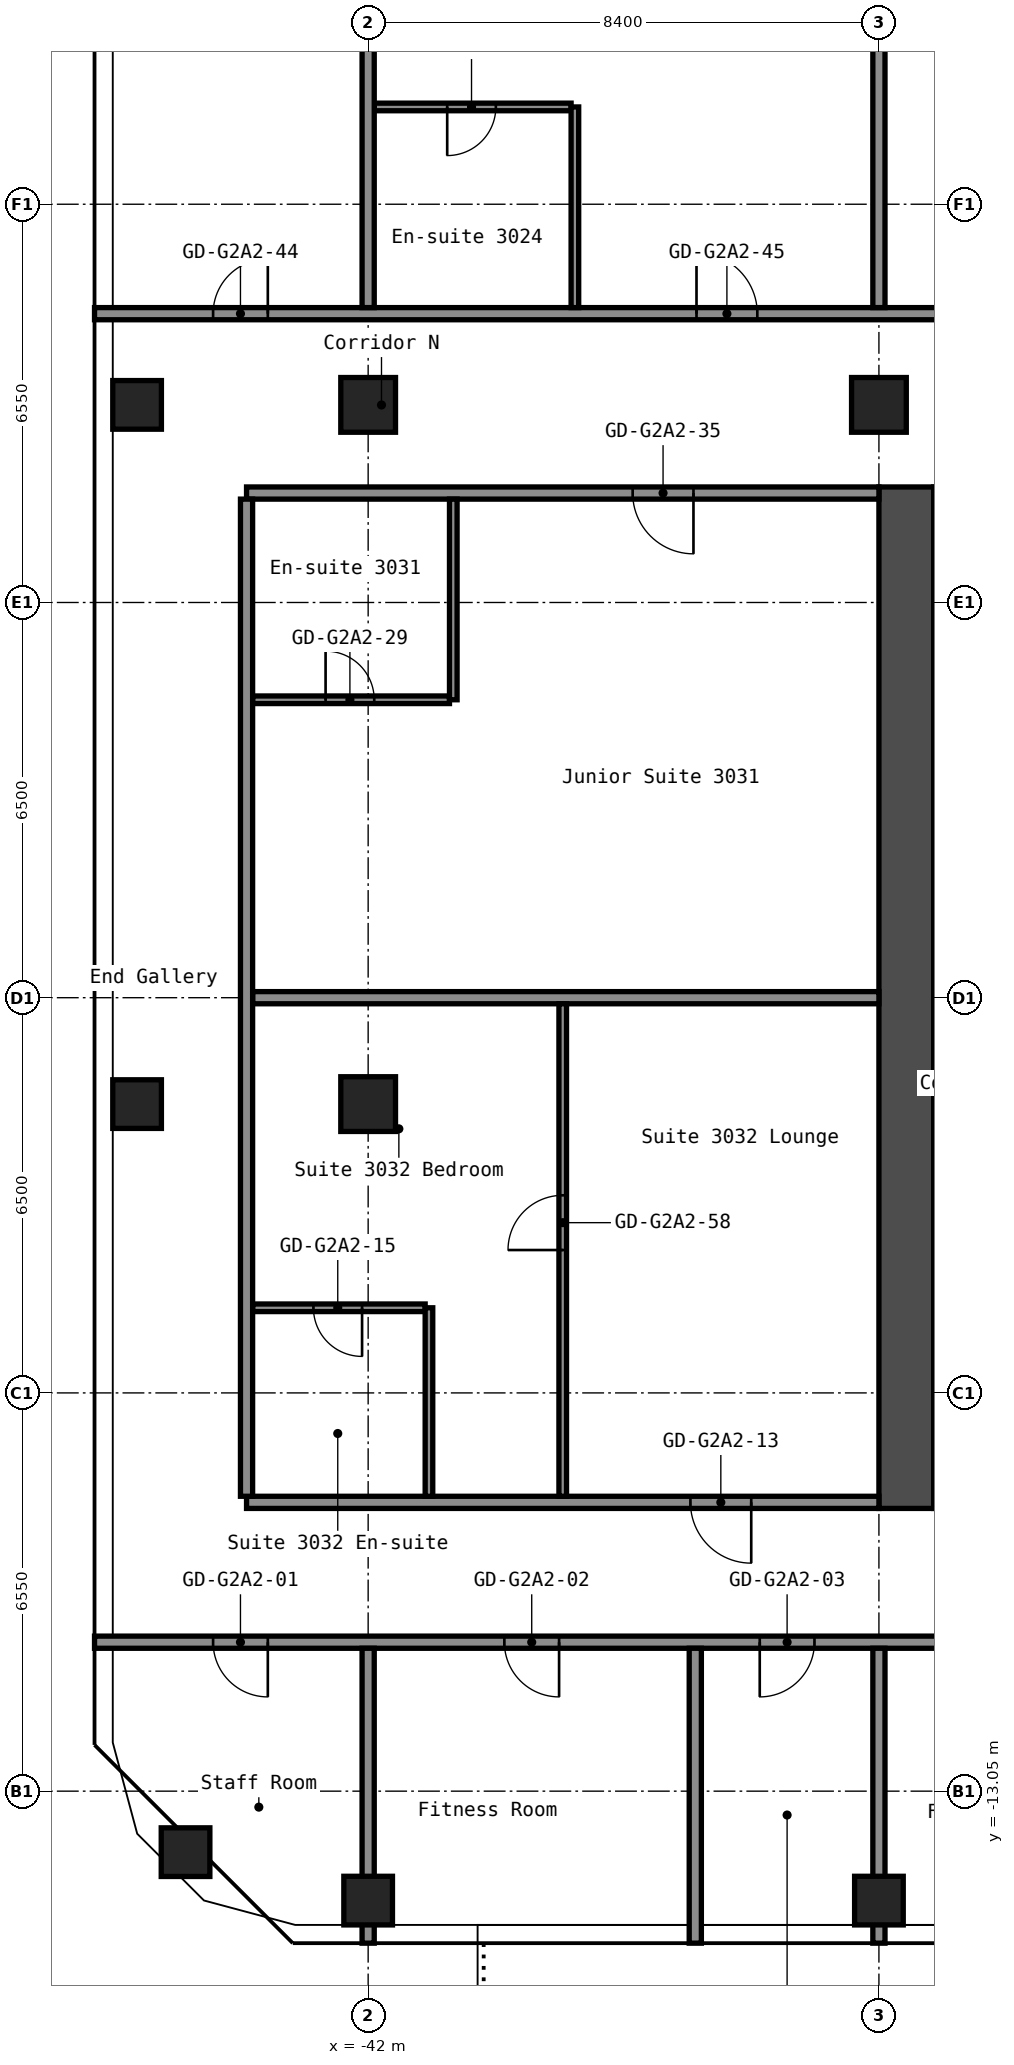
"""IFC4 building model, lengths in metres.
Left out: names, types, materials, properties, quantities, classifications, styles, units other than length and angle.
Written with IfcOpenShell. Run it as: python <this file> out.ifc"""

import sys

from ifc_helpers import new_model, si_unit, direction, frame, frame_2d, origin, origin_2d, place, context, subcontext, project, spatial, rectangle, hollow_rectangle, extrude, element, fill, save


model = new_model("IFC4")
c1 = context("Model", 3, precision=1e-05, world=origin(), true_north=direction((0.0, 1.0)))
c2 = subcontext(c1, "Body", "Model", "MODEL_VIEW")
j1 = project(units=[si_unit("LENGTHUNIT", "METRE"), si_unit("PLANEANGLEUNIT", "RADIAN")], contexts=[c1])
p1 = place(None, origin())
s1 = spatial("IfcSite", under=j1, at=p1, CompositionType="ELEMENT")
p2 = place(p1, origin())
s2 = spatial("IfcBuilding", under=s1, at=p2, CompositionType="ELEMENT")
p3 = place(p2, frame((0.0, 0.0, 107.4)))
s3 = spatial("IfcBuildingStorey", under=s2, at=p3, CompositionType="ELEMENT", Elevation=107.4)
for number, where, z_axis, x_axis in (
    (1, (-45.003, -14.053, 0.0), (0.0, 0.0, 1.0), (1.0, 0.0, 0.0)),
    (2, (-45.8, -1.75, 0.0), (0.0, 0.0, 1.0), (1.0, 0.0, 0.0)),
    (3, (-45.8, 9.75, 0.0), (0.0, 0.0, 1.0), (1.0, 0.0, 0.0)),
    (4, (-42.0, -14.85, 0.0), (0.0, 0.0, 1.0), (1.0, 0.0, 0.0)),
):
    element("IfcColumn", number, at=place(p3, frame(where, z_axis=z_axis, x_axis=x_axis)), inside=s3, PredefinedType="COLUMN", context=c2, shape_type="SweptSolid", body=[
        extrude(hollow_rectangle(XDim=0.8, YDim=0.8, WallThickness=0.032, at=origin_2d()), origin(), (0.0, 0.0, 1.0), 2.8),
    ])
for number, where, z_axis, x_axis in (
    (5, (-42.0, -1.75, 0.0), (0.0, 0.0, 1.0), (1.0, 0.0, 0.0)),
    (6, (-42.0, 9.75, 0.0), (0.0, 0.0, 1.0), (1.0, 0.0, 0.0)),
):
    element("IfcColumn", number, at=place(p3, frame(where, z_axis=z_axis, x_axis=x_axis)), inside=s3, PredefinedType="COLUMN", context=c2, shape_type="SweptSolid", body=[
        extrude(hollow_rectangle(XDim=0.9, YDim=0.9, WallThickness=0.036, at=origin_2d()), origin(), (0.0, 0.0, 1.0), 2.8),
    ])
p4 = place(p3, frame((-33.6, -14.85, 0.0), z_axis=(0.0, 0.0, 1.0), x_axis=(1.0, 0.0, 0.0)))
e7 = element("IfcColumn", 7, at=p4, inside=s3, PredefinedType="COLUMN", context=c2, shape_type="SweptSolid", body=[
    extrude(hollow_rectangle(XDim=0.8, YDim=0.8, WallThickness=0.032, at=origin_2d()), origin(), (0.0, 0.0, 1.0), 2.8),
])
p5 = place(p3, frame((-33.6, 9.75, 0.0), z_axis=(0.0, 0.0, 1.0), x_axis=(1.0, 0.0, 0.0)))
e8 = element("IfcColumn", 8, at=p5, inside=s3, PredefinedType="COLUMN", context=c2, shape_type="SweptSolid", body=[
    extrude(hollow_rectangle(XDim=0.9, YDim=0.9, WallThickness=0.036, at=origin_2d()), origin(), (0.0, 0.0, 1.0), 2.8),
])
p6 = place(p3, frame((-33.15, -8.4, 0.0), z_axis=(0.0, 0.0, 1.0), x_axis=(0.0, 1.0, 0.0)))
e9 = element("IfcWall", 9, at=p6, inside=s3, PredefinedType="SHEAR", context=c2, shape_type="SweptSolid", body=[
    extrude(rectangle(XDim=16.8, YDim=0.9, at=frame_2d((8.4, 0.0))), origin(), (0.0, 0.0, 1.0), 2.8),
])
p7 = place(p3, frame((-46.5, -10.6, 0.0), z_axis=(0.0, 0.0, 1.0), x_axis=(1.0, 0.0, 0.0)))
e10 = element("IfcWall", 10, at=p7, inside=s3, PredefinedType="PARTITIONING", context=c2, shape_type="SweptSolid", body=[
    extrude(rectangle(XDim=29.7, YDim=0.2, at=frame_2d((14.85, 0.0))), origin(), (0.0, 0.0, 1.0), 2.8),
])
p8 = place(p7, frame((1.95, 0.0, 0.0)))
e11 = element("IfcOpeningElement", 11, at=p8, cuts=e10, PredefinedType="OPENING", context=c2, shape_type="SweptSolid", body=[
    extrude(rectangle(XDim=0.9, YDim=2.1, at=frame_2d((0.45, 1.05))), frame((0.0, 0.11, 0.0), z_axis=(0.0, -1.0, 0.0), x_axis=(1.0, 0.0, 0.0)), (0.0, 0.0, 1.0), 0.22),
])
p9 = place(p7, frame((6.74, 0.0, 0.0)))
e12 = element("IfcOpeningElement", 12, at=p9, cuts=e10, PredefinedType="OPENING", context=c2, shape_type="SweptSolid", body=[
    extrude(rectangle(XDim=0.9, YDim=2.1, at=frame_2d((0.45, 1.05))), frame((0.0, 0.11, 0.0), z_axis=(0.0, -1.0, 0.0), x_axis=(1.0, 0.0, 0.0)), (0.0, 0.0, 1.0), 0.22),
])
p10 = place(p7, frame((10.94, 0.0, 0.0)))
e13 = element("IfcOpeningElement", 13, at=p10, cuts=e10, PredefinedType="OPENING", context=c2, shape_type="SweptSolid", body=[
    extrude(rectangle(XDim=0.9, YDim=2.1, at=frame_2d((0.45, 1.05))), frame((0.0, 0.11, 0.0), z_axis=(0.0, -1.0, 0.0), x_axis=(1.0, 0.0, 0.0)), (0.0, 0.0, 1.0), 0.22),
])
p11 = place(p7, frame((15.055, 0.0, 0.0)))
e14 = element("IfcOpeningElement", 14, at=p11, cuts=e10, PredefinedType="OPENING", context=c2, shape_type="SweptSolid", body=[
    extrude(rectangle(XDim=0.9, YDim=2.1, at=frame_2d((0.45, 1.05))), frame((0.0, 0.11, 0.0), z_axis=(0.0, -1.0, 0.0), x_axis=(1.0, 0.0, 0.0)), (0.0, 0.0, 1.0), 0.22),
])
p12 = place(p7, frame((19.255, 0.0, 0.0)))
e15 = element("IfcOpeningElement", 15, at=p12, cuts=e10, PredefinedType="OPENING", context=c2, shape_type="SweptSolid", body=[
    extrude(rectangle(XDim=0.9, YDim=2.1, at=frame_2d((0.45, 1.05))), frame((0.0, 0.11, 0.0), z_axis=(0.0, -1.0, 0.0), x_axis=(1.0, 0.0, 0.0)), (0.0, 0.0, 1.0), 0.22),
])
p13 = place(p7, frame((25.0, 0.0, 0.0)))
e16 = element("IfcOpeningElement", 16, at=p13, cuts=e10, PredefinedType="OPENING", context=c2, shape_type="SweptSolid", body=[
    extrude(rectangle(XDim=1.0, YDim=2.1, at=frame_2d((0.5, 1.05))), frame((0.0, 0.11, 0.0), z_axis=(0.0, -1.0, 0.0), x_axis=(1.0, 0.0, 0.0)), (0.0, 0.0, 1.0), 0.22),
])
p14 = place(p3, frame((-44.0, -8.3, 0.0), z_axis=(0.0, 0.0, 1.0), x_axis=(1.0, 0.0, 0.0)))
e17 = element("IfcWall", 17, at=p14, inside=s3, PredefinedType="PARTITIONING", context=c2, shape_type="SweptSolid", body=[
    extrude(rectangle(XDim=10.4, YDim=0.2, at=frame_2d((5.2, 0.0))), origin(), (0.0, 0.0, 1.0), 2.8),
])
p15 = place(p14, frame((7.3, 0.0, 0.0)))
e18 = element("IfcOpeningElement", 18, at=p15, cuts=e17, PredefinedType="OPENING", context=c2, shape_type="SweptSolid", body=[
    extrude(rectangle(XDim=1.0, YDim=2.1, at=frame_2d((0.5, 1.05))), frame((0.0, 0.11, 0.0), z_axis=(0.0, -1.0, 0.0), x_axis=(1.0, 0.0, 0.0)), (0.0, 0.0, 1.0), 0.22),
])
p16 = place(p3, frame((-43.9, -5.1, 0.0), z_axis=(0.0, 0.0, 1.0), x_axis=(1.0, 0.0, 0.0)))
e19 = element("IfcWall", 19, at=p16, inside=s3, PredefinedType="PARTITIONING", context=c2, shape_type="SweptSolid", body=[
    extrude(rectangle(XDim=2.837, YDim=0.125, at=frame_2d((1.419, 0.0))), origin(), (0.0, 0.0, 1.0), 2.8),
])
p17 = place(p16, frame((1.0, 0.0, 0.0)))
e20 = element("IfcOpeningElement", 20, at=p17, cuts=e19, PredefinedType="OPENING", context=c2, shape_type="SweptSolid", body=[
    extrude(rectangle(XDim=0.8, YDim=2.1, at=frame_2d((0.4, 1.05))), frame((0.0, 0.073, 0.0), z_axis=(0.0, -1.0, 0.0), x_axis=(1.0, 0.0, 0.0)), (0.0, 0.0, 1.0), 0.145),
])
p18 = place(p3, frame((-43.9, 0.0, 0.0), z_axis=(0.0, 0.0, 1.0), x_axis=(1.0, 0.0, 0.0)))
e21 = element("IfcWall", 21, at=p18, inside=s3, PredefinedType="PARTITIONING", context=c2, shape_type="SweptSolid", body=[
    extrude(rectangle(XDim=10.3, YDim=0.2, at=frame_2d((5.15, 0.0))), origin(), (0.0, 0.0, 1.0), 2.8),
])
p19 = place(p3, frame((-43.9, 4.9, 0.0), z_axis=(0.0, 0.0, 1.0), x_axis=(1.0, 0.0, 0.0)))
e22 = element("IfcWall", 22, at=p19, inside=s3, PredefinedType="PARTITIONING", context=c2, shape_type="SweptSolid", body=[
    extrude(rectangle(XDim=3.237, YDim=0.125, at=frame_2d((1.619, 0.0))), origin(), (0.0, 0.0, 1.0), 2.8),
])
p20 = place(p19, frame((1.2, 0.0, 0.0)))
e23 = element("IfcOpeningElement", 23, at=p20, cuts=e22, PredefinedType="OPENING", context=c2, shape_type="SweptSolid", body=[
    extrude(rectangle(XDim=0.8, YDim=2.1, at=frame_2d((0.4, 1.05))), frame((0.0, 0.073, 0.0), z_axis=(0.0, -1.0, 0.0), x_axis=(1.0, 0.0, 0.0)), (0.0, 0.0, 1.0), 0.145),
])
p21 = place(p3, frame((-44.0, 8.3, 0.0), z_axis=(0.0, 0.0, 1.0), x_axis=(1.0, 0.0, 0.0)))
e24 = element("IfcWall", 24, at=p21, inside=s3, PredefinedType="PARTITIONING", context=c2, shape_type="SweptSolid", body=[
    extrude(rectangle(XDim=10.4, YDim=0.2, at=frame_2d((5.2, 0.0))), origin(), (0.0, 0.0, 1.0), 2.8),
])
p22 = place(p21, frame((6.35, 0.0, 0.0)))
e25 = element("IfcOpeningElement", 25, at=p22, cuts=e24, PredefinedType="OPENING", context=c2, shape_type="SweptSolid", body=[
    extrude(rectangle(XDim=1.0, YDim=2.1, at=frame_2d((0.5, 1.05))), frame((0.0, 0.11, 0.0), z_axis=(0.0, -1.0, 0.0), x_axis=(1.0, 0.0, 0.0)), (0.0, 0.0, 1.0), 0.22),
])
p23 = place(p3, frame((-46.5, 11.25, 0.0), z_axis=(0.0, 0.0, 1.0), x_axis=(1.0, 0.0, 0.0)))
e26 = element("IfcWall", 26, at=p23, inside=s3, PredefinedType="PARTITIONING", context=c2, shape_type="SweptSolid", body=[
    extrude(rectangle(XDim=29.7, YDim=0.2, at=frame_2d((14.85, 0.0))), origin(), (0.0, 0.0, 1.0), 2.8),
])
p24 = place(p23, frame((1.95, 0.0, 0.0)))
e27 = element("IfcOpeningElement", 27, at=p24, cuts=e26, PredefinedType="OPENING", context=c2, shape_type="SweptSolid", body=[
    extrude(rectangle(XDim=0.9, YDim=2.1, at=frame_2d((0.45, 1.05))), frame((0.0, 0.11, 0.0), z_axis=(0.0, -1.0, 0.0), x_axis=(1.0, 0.0, 0.0)), (0.0, 0.0, 1.0), 0.22),
])
p25 = place(p23, frame((9.9, 0.0, 0.0)))
e28 = element("IfcOpeningElement", 28, at=p25, cuts=e26, PredefinedType="OPENING", context=c2, shape_type="SweptSolid", body=[
    extrude(rectangle(XDim=1.0, YDim=2.1, at=frame_2d((0.5, 1.05))), frame((0.0, 0.11, 0.0), z_axis=(0.0, -1.0, 0.0), x_axis=(1.0, 0.0, 0.0)), (0.0, 0.0, 1.0), 0.22),
])
p26 = place(p23, frame((14.9, 0.0, 0.0)))
e29 = element("IfcOpeningElement", 29, at=p26, cuts=e26, PredefinedType="OPENING", context=c2, shape_type="SweptSolid", body=[
    extrude(rectangle(XDim=1.0, YDim=2.1, at=frame_2d((0.5, 1.05))), frame((0.0, 0.11, 0.0), z_axis=(0.0, -1.0, 0.0), x_axis=(1.0, 0.0, 0.0)), (0.0, 0.0, 1.0), 0.22),
])
p27 = place(p23, frame((26.7, 0.0, 0.0)))
e30 = element("IfcOpeningElement", 30, at=p27, cuts=e26, PredefinedType="OPENING", context=c2, shape_type="SweptSolid", body=[
    extrude(rectangle(XDim=1.0, YDim=2.1, at=frame_2d((0.5, 1.05))), frame((0.0, 0.11, 0.0), z_axis=(0.0, -1.0, 0.0), x_axis=(1.0, 0.0, 0.0)), (0.0, 0.0, 1.0), 0.22),
])
p28 = place(p3, frame((-41.9, 14.65, 0.0), z_axis=(0.0, 0.0, 1.0), x_axis=(1.0, 0.0, 0.0)))
e31 = element("IfcWall", 31, at=p28, inside=s3, PredefinedType="PARTITIONING", context=c2, shape_type="SweptSolid", body=[
    extrude(rectangle(XDim=3.237, YDim=0.125, at=frame_2d((1.619, 0.0))), origin(), (0.0, 0.0, 1.0), 2.8),
])
p29 = place(p28, frame((1.2, 0.0, 0.0)))
e32 = element("IfcOpeningElement", 32, at=p29, cuts=e31, PredefinedType="OPENING", context=c2, shape_type="SweptSolid", body=[
    extrude(rectangle(XDim=0.8, YDim=2.1, at=frame_2d((0.4, 1.05))), frame((0.0, 0.073, 0.0), z_axis=(0.0, -1.0, 0.0), x_axis=(1.0, 0.0, 0.0)), (0.0, 0.0, 1.0), 0.145),
])
p30 = place(p3, frame((-44.0, -8.2, 0.0), z_axis=(0.0, 0.0, 1.0), x_axis=(0.0, 1.0, 0.0)))
e33 = element("IfcWall", 33, at=p30, inside=s3, PredefinedType="PARTITIONING", context=c2, shape_type="SweptSolid", body=[
    extrude(rectangle(XDim=16.4, YDim=0.2, at=frame_2d((8.2, 0.0))), origin(), (0.0, 0.0, 1.0), 2.8),
])
p31 = place(p3, frame((-42.0, -15.55, 0.0), z_axis=(0.0, 0.0, 1.0), x_axis=(0.0, 1.0, 0.0)))
e34 = element("IfcWall", 34, at=p31, inside=s3, PredefinedType="PARTITIONING", context=c2, shape_type="SweptSolid", body=[
    extrude(rectangle(XDim=4.85, YDim=0.2, at=frame_2d((2.425, 0.0))), origin(), (0.0, 0.0, 1.0), 2.8),
])
p32 = place(p3, frame((-42.0, 11.35, 0.0), z_axis=(0.0, 0.0, 1.0), x_axis=(0.0, 1.0, 0.0)))
e35 = element("IfcWall", 35, at=p32, inside=s3, PredefinedType="PARTITIONING", context=c2, shape_type="SweptSolid", body=[
    extrude(rectangle(XDim=12.2, YDim=0.2, at=frame_2d((6.1, 0.0))), origin(), (0.0, 0.0, 1.0), 2.8),
])
p33 = place(p3, frame((-41.0, -8.2, 0.0), z_axis=(0.0, 0.0, 1.0), x_axis=(0.0, 1.0, 0.0)))
e36 = element("IfcWall", 36, at=p33, inside=s3, PredefinedType="PARTITIONING", context=c2, shape_type="SweptSolid", body=[
    extrude(rectangle(XDim=3.1, YDim=0.125, at=frame_2d((1.55, 0.0))), origin(), (0.0, 0.0, 1.0), 2.8),
])
p34 = place(p3, frame((-40.6, 4.9, 0.0), z_axis=(0.0, 0.0, 1.0), x_axis=(0.0, 1.0, 0.0)))
e37 = element("IfcWall", 37, at=p34, inside=s3, PredefinedType="PARTITIONING", context=c2, shape_type="SweptSolid", body=[
    extrude(rectangle(XDim=3.3, YDim=0.125, at=frame_2d((1.65, 0.0))), origin(), (0.0, 0.0, 1.0), 2.8),
])
p35 = place(p3, frame((-38.8, -8.2, 0.0), z_axis=(0.0, 0.0, 1.0), x_axis=(0.0, 1.0, 0.0)))
e38 = element("IfcWall", 38, at=p35, inside=s3, PredefinedType="PARTITIONING", context=c2, shape_type="SweptSolid", body=[
    extrude(rectangle(XDim=8.1, YDim=0.125, at=frame_2d((4.05, 0.0))), origin(), (0.0, 0.0, 1.0), 2.8),
])
p36 = place(p35, frame((4.05, 0.0, 0.0)))
e39 = element("IfcOpeningElement", 39, at=p36, cuts=e38, PredefinedType="OPENING", context=c2, shape_type="SweptSolid", body=[
    extrude(rectangle(XDim=0.9, YDim=2.1, at=frame_2d((0.45, 1.05))), frame((0.0, 0.073, 0.0), z_axis=(0.0, -1.0, 0.0), x_axis=(1.0, 0.0, 0.0)), (0.0, 0.0, 1.0), 0.145),
])
p37 = place(p3, frame((-38.6, 11.35, 0.0), z_axis=(0.0, 0.0, 1.0), x_axis=(0.0, 1.0, 0.0)))
e40 = element("IfcWall", 40, at=p37, inside=s3, PredefinedType="PARTITIONING", context=c2, shape_type="SweptSolid", body=[
    extrude(rectangle(XDim=3.3, YDim=0.125, at=frame_2d((1.65, 0.0))), origin(), (0.0, 0.0, 1.0), 2.8),
])
for number, where, z_axis, x_axis in (
    (41, (-36.62, -15.55, 0.0), (0.0, 0.0, 1.0), (0.0, 1.0, 0.0)),
    (42, (-33.6, -15.55, 0.0), (0.0, 0.0, 1.0), (0.0, 1.0, 0.0)),
):
    element("IfcWall", number, at=place(p3, frame(where, z_axis=z_axis, x_axis=x_axis)), inside=s3, PredefinedType="PARTITIONING", context=c2, shape_type="SweptSolid", body=[
        extrude(rectangle(XDim=4.85, YDim=0.2, at=frame_2d((2.425, 0.0))), origin(), (0.0, 0.0, 1.0), 2.8),
    ])
p38 = place(p3, frame((-33.6, 11.35, 0.0), z_axis=(0.0, 0.0, 1.0), x_axis=(0.0, 1.0, 0.0)))
e43 = element("IfcWall", 43, at=p38, inside=s3, PredefinedType="PARTITIONING", context=c2, shape_type="SweptSolid", body=[
    extrude(rectangle(XDim=12.2, YDim=0.2, at=frame_2d((6.1, 0.0))), origin(), (0.0, 0.0, 1.0), 2.8),
])
p39 = place(p8, origin())
e44 = element("IfcDoor", 44, at=p39, inside=s3, OperationType="SINGLE_SWING_RIGHT", PredefinedType="DOOR", context=c2, shape_type="SweptSolid", body=[
    extrude(rectangle(XDim=0.9, YDim=2.1, at=frame_2d((0.45, 1.05))), frame((0.0, 0.025, 0.0), z_axis=(0.0, -1.0, 0.0), x_axis=(1.0, 0.0, 0.0)), (0.0, 0.0, 1.0), 0.05),
])
fill(e11, e44)
p40 = place(p9, origin())
e45 = element("IfcDoor", 45, at=p40, inside=s3, OperationType="SINGLE_SWING_RIGHT", PredefinedType="DOOR", context=c2, shape_type="SweptSolid", body=[
    extrude(rectangle(XDim=0.9, YDim=2.1, at=frame_2d((0.45, 1.05))), frame((0.0, 0.025, 0.0), z_axis=(0.0, -1.0, 0.0), x_axis=(1.0, 0.0, 0.0)), (0.0, 0.0, 1.0), 0.05),
])
fill(e12, e45)
p41 = place(p10, origin())
e46 = element("IfcDoor", 46, at=p41, inside=s3, OperationType="SINGLE_SWING_LEFT", PredefinedType="DOOR", context=c2, shape_type="SweptSolid", body=[
    extrude(rectangle(XDim=0.9, YDim=2.1, at=frame_2d((0.45, 1.05))), frame((0.0, 0.025, 0.0), z_axis=(0.0, -1.0, 0.0), x_axis=(1.0, 0.0, 0.0)), (0.0, 0.0, 1.0), 0.05),
])
fill(e13, e46)
p42 = place(p15, origin())
e47 = element("IfcDoor", 47, at=p42, inside=s3, OperationType="SINGLE_SWING_RIGHT", PredefinedType="DOOR", context=c2, shape_type="SweptSolid", body=[
    extrude(rectangle(XDim=1.0, YDim=2.1, at=frame_2d((0.5, 1.05))), frame((0.0, 0.025, 0.0), z_axis=(0.0, -1.0, 0.0), x_axis=(1.0, 0.0, 0.0)), (0.0, 0.0, 1.0), 0.05),
])
fill(e18, e47)
p43 = place(p17, origin())
e48 = element("IfcDoor", 48, at=p43, inside=s3, OperationType="SINGLE_SWING_RIGHT", PredefinedType="DOOR", context=c2, shape_type="SweptSolid", body=[
    extrude(rectangle(XDim=0.8, YDim=2.1, at=frame_2d((0.4, 1.05))), frame((0.0, 0.025, 0.0), z_axis=(0.0, -1.0, 0.0), x_axis=(1.0, 0.0, 0.0)), (0.0, 0.0, 1.0), 0.05),
])
fill(e20, e48)
p44 = place(p20, origin())
e49 = element("IfcDoor", 49, at=p44, inside=s3, OperationType="SINGLE_SWING_RIGHT", PredefinedType="DOOR", context=c2, shape_type="SweptSolid", body=[
    extrude(rectangle(XDim=0.8, YDim=2.1, at=frame_2d((0.4, 1.05))), frame((0.0, 0.025, 0.0), z_axis=(0.0, -1.0, 0.0), x_axis=(1.0, 0.0, 0.0)), (0.0, 0.0, 1.0), 0.05),
])
fill(e23, e49)
p45 = place(p22, origin())
e50 = element("IfcDoor", 50, at=p45, inside=s3, OperationType="SINGLE_SWING_RIGHT", PredefinedType="DOOR", context=c2, shape_type="SweptSolid", body=[
    extrude(rectangle(XDim=1.0, YDim=2.1, at=frame_2d((0.5, 1.05))), frame((0.0, 0.025, 0.0), z_axis=(0.0, -1.0, 0.0), x_axis=(1.0, 0.0, 0.0)), (0.0, 0.0, 1.0), 0.05),
])
fill(e25, e50)
p46 = place(p24, origin())
e51 = element("IfcDoor", 51, at=p46, inside=s3, OperationType="SINGLE_SWING_LEFT", PredefinedType="DOOR", context=c2, shape_type="SweptSolid", body=[
    extrude(rectangle(XDim=0.9, YDim=2.1, at=frame_2d((0.45, 1.05))), frame((0.0, 0.025, 0.0), z_axis=(0.0, -1.0, 0.0), x_axis=(1.0, 0.0, 0.0)), (0.0, 0.0, 1.0), 0.05),
])
fill(e27, e51)
p47 = place(p25, origin())
e52 = element("IfcDoor", 52, at=p47, inside=s3, OperationType="SINGLE_SWING_RIGHT", PredefinedType="DOOR", context=c2, shape_type="SweptSolid", body=[
    extrude(rectangle(XDim=1.0, YDim=2.1, at=frame_2d((0.5, 1.05))), frame((0.0, 0.025, 0.0), z_axis=(0.0, -1.0, 0.0), x_axis=(1.0, 0.0, 0.0)), (0.0, 0.0, 1.0), 0.05),
])
fill(e28, e52)
p48 = place(p29, origin())
e53 = element("IfcDoor", 53, at=p48, inside=s3, OperationType="SINGLE_SWING_LEFT", PredefinedType="DOOR", context=c2, shape_type="SweptSolid", body=[
    extrude(rectangle(XDim=0.8, YDim=2.1, at=frame_2d((0.4, 1.05))), frame((0.0, 0.025, 0.0), z_axis=(0.0, -1.0, 0.0), x_axis=(1.0, 0.0, 0.0)), (0.0, 0.0, 1.0), 0.05),
])
fill(e32, e53)
p49 = place(p36, origin())
e54 = element("IfcDoor", 54, at=p49, inside=s3, OperationType="SINGLE_SWING_RIGHT", PredefinedType="DOOR", context=c2, shape_type="SweptSolid", body=[
    extrude(rectangle(XDim=0.9, YDim=2.1, at=frame_2d((0.45, 1.05))), frame((0.0, 0.025, 0.0), z_axis=(0.0, -1.0, 0.0), x_axis=(1.0, 0.0, 0.0)), (0.0, 0.0, 1.0), 0.05),
])
fill(e39, e54)
save(model, sys.argv[1])
